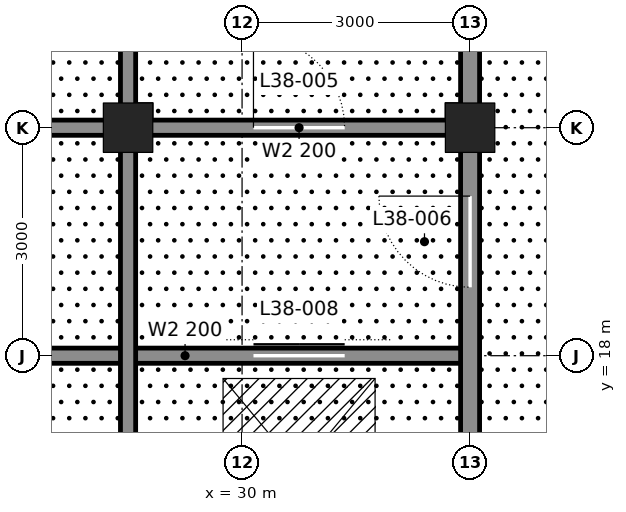
"""IFC4 building model, lengths in metres.
Left out: names, types, materials, properties, quantities, classifications, styles, units other than length and angle.
Written with IfcOpenShell. Run it as: python <this file> out.ifc"""

import sys

from ifc_helpers import new_model, si_unit, direction, frame, frame_2d, origin, origin_2d, place, context, subcontext, project, spatial, rectangle, hollow_rectangle, extrude, element, fill, save


model = new_model("IFC4")
c1 = context("Model", 3, precision=1e-05, world=origin(), true_north=direction((0.0, 1.0)))
c2 = subcontext(c1, "Body", "Model", "MODEL_VIEW")
j1 = project(units=[si_unit("LENGTHUNIT", "METRE"), si_unit("PLANEANGLEUNIT", "RADIAN")], contexts=[c1])
p1 = place(None, origin())
s1 = spatial("IfcSite", under=j1, at=p1, CompositionType="ELEMENT")
p2 = place(p1, origin())
s2 = spatial("IfcBuilding", under=s1, at=p2, CompositionType="ELEMENT")
p3 = place(p2, frame((0.0, 0.0, 174.0)))
s3 = spatial("IfcBuildingStorey", under=s2, at=p3, CompositionType="ELEMENT", Elevation=174.0)
for number, where, z_axis, x_axis in (
    (1, (33.0, 21.0, 0.0), (0.0, 0.0, 1.0), (1.0, 0.0, 0.0)),
    (2, (28.5, 21.0, 0.0), (0.0, 0.0, 1.0), (1.0, 0.0, 0.0)),
):
    element("IfcColumn", number, at=place(p3, frame(where, z_axis=z_axis, x_axis=x_axis)), inside=s3, PredefinedType="COLUMN", context=c2, shape_type="SweptSolid", body=[
        extrude(hollow_rectangle(XDim=0.65, YDim=0.65, WallThickness=0.065, at=origin_2d()), origin(), (0.0, 0.0, 1.0), 6.0),
    ])
p4 = place(p3, frame((25.5, 18.0, 0.0), z_axis=(0.0, 0.0, 1.0), x_axis=(1.0, 0.0, 0.0)))
e3 = element("IfcWall", 3, at=p4, inside=s3, PredefinedType="SOLIDWALL", context=c2, shape_type="SweptSolid", body=[
    extrude(rectangle(XDim=7.5, YDim=0.2, at=frame_2d((3.75, 0.0))), origin(), (0.0, 0.0, 1.0), 5.84),
])
p5 = place(p4, frame((4.65, 0.0, 0.0)))
e4 = element("IfcOpeningElement", 4, at=p5, cuts=e3, PredefinedType="OPENING", context=c2, shape_type="SweptSolid", body=[
    extrude(rectangle(XDim=1.2, YDim=2.1, at=frame_2d((0.6, 1.05))), frame((0.0, 0.11, 0.0), z_axis=(0.0, -1.0, 0.0), x_axis=(1.0, 0.0, 0.0)), (0.0, 0.0, 1.0), 0.22),
])
p6 = place(p3, frame((25.5, 21.0, 0.0), z_axis=(0.0, 0.0, 1.0), x_axis=(1.0, 0.0, 0.0)))
e5 = element("IfcWall", 5, at=p6, inside=s3, PredefinedType="SOLIDWALL", context=c2, shape_type="SweptSolid", body=[
    extrude(rectangle(XDim=2.75, YDim=0.2, at=frame_2d((1.375, 0.0))), origin(), (0.0, 0.0, 1.0), 4.89),
])
p7 = place(p3, frame((28.75, 21.0, 0.0), z_axis=(0.0, 0.0, 1.0), x_axis=(1.0, 0.0, 0.0)))
e6 = element("IfcWall", 6, at=p7, inside=s3, PredefinedType="SOLIDWALL", context=c2, shape_type="SweptSolid", body=[
    extrude(rectangle(XDim=4.0, YDim=0.2, at=frame_2d((2.0, 0.0))), origin(), (0.0, 0.0, 1.0), 4.89),
])
p8 = place(p7, frame((1.4, 0.0, 0.0)))
e7 = element("IfcOpeningElement", 7, at=p8, cuts=e6, PredefinedType="OPENING", context=c2, shape_type="SweptSolid", body=[
    extrude(rectangle(XDim=1.2, YDim=2.1, at=frame_2d((0.6, 1.05))), frame((0.0, 0.11, 0.0), z_axis=(0.0, -1.0, 0.0), x_axis=(1.0, 0.0, 0.0)), (0.0, 0.0, 1.0), 0.22),
])
p9 = place(p3, frame((28.5, 12.25, 0.0), z_axis=(0.0, 0.0, 1.0), x_axis=(0.0, 1.0, 0.0)))
e8 = element("IfcWall", 8, at=p9, inside=s3, PredefinedType="SOLIDWALL", context=c2, shape_type="SweptSolid", body=[
    extrude(rectangle(XDim=8.5, YDim=0.2, at=frame_2d((4.25, 0.0))), origin(), (0.0, 0.0, 1.0), 4.913),
])
p10 = place(p3, frame((28.5, 21.25, 0.0), z_axis=(0.0, 0.0, 1.0), x_axis=(0.0, 1.0, 0.0)))
e9 = element("IfcWall", 9, at=p10, inside=s3, PredefinedType="SOLIDWALL", context=c2, shape_type="SweptSolid", body=[
    extrude(rectangle(XDim=2.5, YDim=0.2, at=frame_2d((1.25, 0.0))), origin(), (0.0, 0.0, 1.0), 4.913),
])
p11 = place(p3, frame((33.0, 12.25, 0.0), z_axis=(0.0, 0.0, 1.0), x_axis=(0.0, 1.0, 0.0)))
e10 = element("IfcWall", 10, at=p11, inside=s3, PredefinedType="SOLIDWALL", context=c2, shape_type="SweptSolid", body=[
    extrude(rectangle(XDim=8.5, YDim=0.25, at=frame_2d((4.25, 0.0))), origin(), (0.0, 0.0, 1.0), 4.913),
])
p12 = place(p11, frame((6.65, 0.0, 0.0)))
e11 = element("IfcOpeningElement", 11, at=p12, cuts=e10, PredefinedType="OPENING", context=c2, shape_type="SweptSolid", body=[
    extrude(rectangle(XDim=1.2, YDim=2.1, at=frame_2d((0.6, 1.05))), frame((0.0, 0.135, 0.0), z_axis=(0.0, -1.0, 0.0), x_axis=(1.0, 0.0, 0.0)), (0.0, 0.0, 1.0), 0.27),
])
p13 = place(p11, frame((0.875, 0.0, 0.0)))
e12 = element("IfcOpeningElement", 12, at=p13, cuts=e10, PredefinedType="OPENING", context=c2, shape_type="SweptSolid", body=[
    extrude(rectangle(XDim=0.75, YDim=2.1, at=frame_2d((0.375, 1.05))), frame((0.0, 0.135, 0.0), z_axis=(0.0, -1.0, 0.0), x_axis=(1.0, 0.0, 0.0)), (0.0, 0.0, 1.0), 0.27),
])
p14 = place(p3, frame((33.0, 21.25, 0.0), z_axis=(0.0, 0.0, 1.0), x_axis=(0.0, 1.0, 0.0)))
e13 = element("IfcWall", 13, at=p14, inside=s3, PredefinedType="SOLIDWALL", context=c2, shape_type="SweptSolid", body=[
    extrude(rectangle(XDim=2.5, YDim=0.25, at=frame_2d((1.25, 0.0))), origin(), (0.0, 0.0, 1.0), 4.913),
])
p15 = place(p8, origin())
e14 = element("IfcDoor", 14, at=p15, inside=s3, OperationType="SINGLE_SWING_LEFT", PredefinedType="DOOR", context=c2, shape_type="SweptSolid", body=[
    extrude(rectangle(XDim=1.2, YDim=2.1, at=frame_2d((0.6, 1.05))), frame((0.0, 0.025, 0.0), z_axis=(0.0, -1.0, 0.0), x_axis=(1.0, 0.0, 0.0)), (0.0, 0.0, 1.0), 0.05),
])
fill(e7, e14)
p16 = place(p12, origin())
e15 = element("IfcDoor", 15, at=p16, inside=s3, OperationType="SINGLE_SWING_RIGHT", PredefinedType="DOOR", context=c2, shape_type="SweptSolid", body=[
    extrude(rectangle(XDim=1.2, YDim=2.1, at=frame_2d((0.6, 1.05))), frame((0.0, 0.025, 0.0), z_axis=(0.0, -1.0, 0.0), x_axis=(1.0, 0.0, 0.0)), (0.0, 0.0, 1.0), 0.05),
])
fill(e11, e15)
p17 = place(p5, origin())
e16 = element("IfcDoor", 16, at=p17, inside=s3, OperationType="DOUBLE_DOOR_SLIDING", PredefinedType="DOOR", context=c2, shape_type="SweptSolid", body=[
    extrude(rectangle(XDim=1.2, YDim=2.1, at=frame_2d((0.6, 1.05))), frame((0.0, 0.025, 0.0), z_axis=(0.0, -1.0, 0.0), x_axis=(1.0, 0.0, 0.0)), (0.0, 0.0, 1.0), 0.05),
])
fill(e4, e16)
save(model, sys.argv[1])
